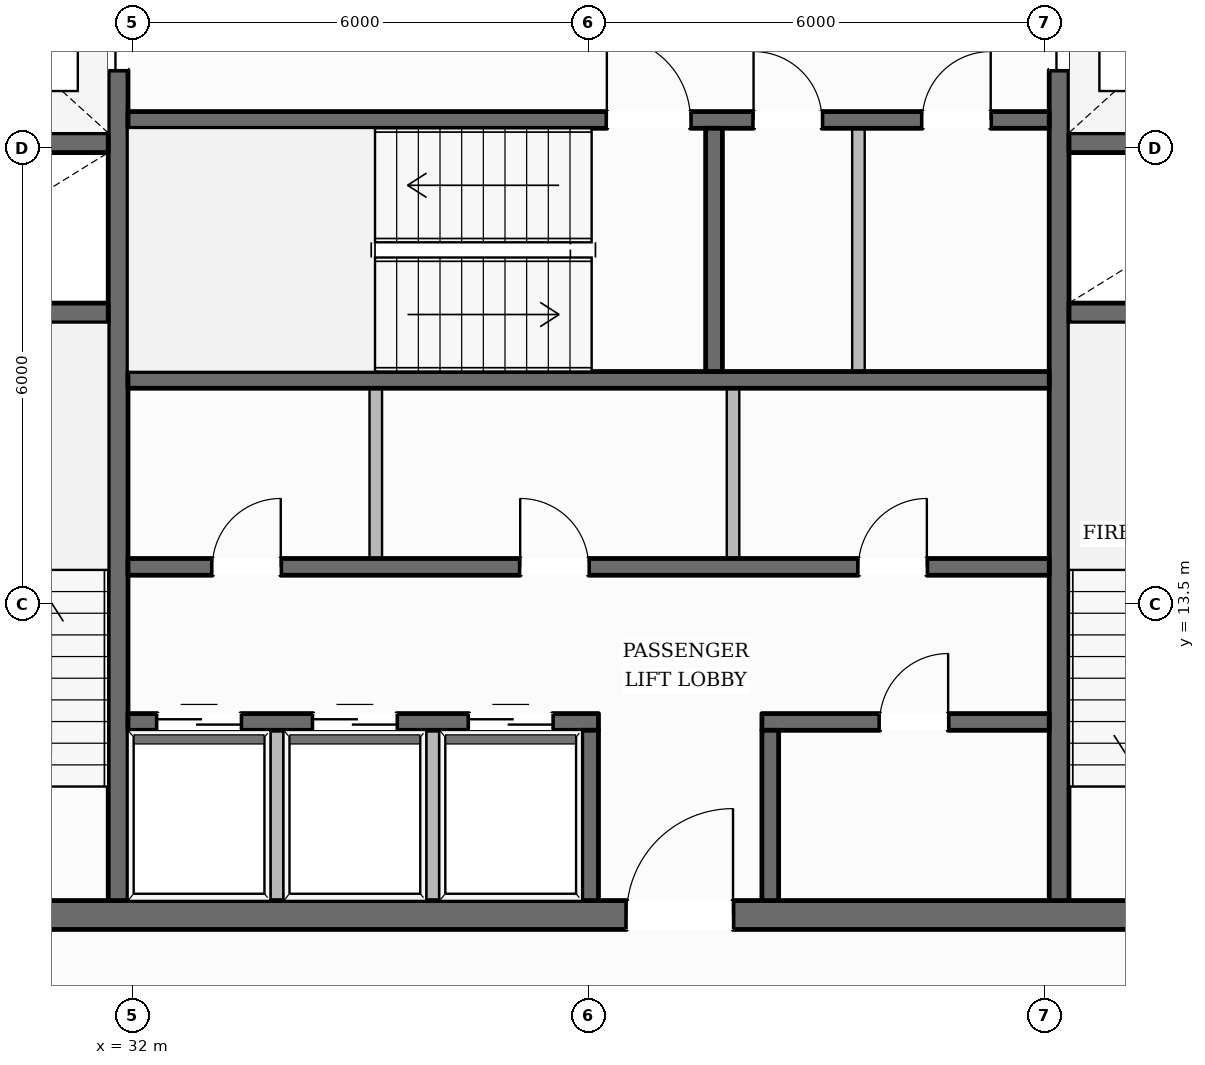
"""IFC4 building model, lengths in metres.
Left out: names, types, materials, properties, quantities, classifications, styles, units other than length and angle.
Written with IfcOpenShell. Run it as: python <this file> out.ifc"""

import sys

from ifc_helpers import new_model, si_unit, direction, frame, frame_2d, origin, place, context, subcontext, project, spatial, rectangle, extrude, element, fill, save


model = new_model("IFC4")
c1 = context("Model", 3, precision=1e-05, world=origin(), true_north=direction((0.0, 1.0)))
c2 = subcontext(c1, "Body", "Model", "MODEL_VIEW")
j1 = project(units=[si_unit("LENGTHUNIT", "METRE"), si_unit("PLANEANGLEUNIT", "RADIAN")], contexts=[c1])
p1 = place(None, origin())
s1 = spatial("IfcSite", under=j1, at=p1, CompositionType="ELEMENT")
p2 = place(p1, origin())
s2 = spatial("IfcBuilding", under=s1, at=p2, CompositionType="ELEMENT")
p3 = place(p2, frame((0.0, 0.0, 289.55)))
s3 = spatial("IfcBuildingStorey", under=s2, at=p3, CompositionType="ELEMENT", Elevation=289.55)
p4 = place(p3, frame((28.1, 9.41, 0.0), z_axis=(0.0, 0.0, 1.0), x_axis=(1.0, 0.0, 0.0)))
e1 = element("IfcWall", 1, at=p4, inside=s3, PredefinedType="SOLIDWALL", context=c2, shape_type="SweptSolid", body=[
    extrude(rectangle(XDim=19.8, YDim=0.38, at=frame_2d((9.9, 0.0))), origin(), (0.0, 0.0, 1.0), 3.61),
])
p5 = place(p4, frame((10.4, 0.0, 0.0)))
e2 = element("IfcOpeningElement", 2, at=p5, cuts=e1, PredefinedType="OPENING", context=c2, shape_type="SweptSolid", body=[
    extrude(rectangle(XDim=1.4, YDim=2.2, at=frame_2d((0.7, 1.1))), frame((0.0, 0.2, 0.0), z_axis=(0.0, -1.0, 0.0), x_axis=(1.0, 0.0, 0.0)), (0.0, 0.0, 1.0), 0.4),
])
p6 = place(p3, frame((31.81, 9.6, 0.0), z_axis=(0.0, 0.0, 1.0), x_axis=(0.0, 1.0, 0.0)))
e3 = element("IfcWall", 3, at=p6, inside=s3, PredefinedType="SHEAR", context=c2, shape_type="SweptSolid", body=[
    extrude(rectangle(XDim=13.0, YDim=0.26, at=frame_2d((6.5, 0.0))), origin(), (0.0, 0.0, 1.0), 3.61),
])
p7 = place(p6, frame((10.925, 0.0, 0.0)))
e4 = element("IfcOpeningElement", 4, at=p7, cuts=e3, PredefinedType="OPENING", context=c2, shape_type="SweptSolid", body=[
    extrude(rectangle(XDim=1.25, YDim=2.25, at=frame_2d((0.625, 1.125))), frame((0.0, 0.14, 0.0), z_axis=(0.0, -1.0, 0.0), x_axis=(1.0, 0.0, 0.0)), (0.0, 0.0, 1.0), 0.28),
])
p8 = place(p3, frame((44.19, 9.6, 0.0), z_axis=(0.0, 0.0, 1.0), x_axis=(0.0, 1.0, 0.0)))
e5 = element("IfcWall", 5, at=p8, inside=s3, PredefinedType="SHEAR", context=c2, shape_type="SweptSolid", body=[
    extrude(rectangle(XDim=13.0, YDim=0.26, at=frame_2d((6.5, 0.0))), origin(), (0.0, 0.0, 1.0), 3.61),
])
p9 = place(p8, frame((10.925, 0.0, 0.0)))
e6 = element("IfcOpeningElement", 6, at=p9, cuts=e5, PredefinedType="OPENING", context=c2, shape_type="SweptSolid", body=[
    extrude(rectangle(XDim=1.25, YDim=2.25, at=frame_2d((0.625, 1.125))), frame((0.0, 0.14, 0.0), z_axis=(0.0, -1.0, 0.0), x_axis=(1.0, 0.0, 0.0)), (0.0, 0.0, 1.0), 0.28),
])
for number, where, z_axis, x_axis in (
    (7, (28.48, 17.33, 0.0), (0.0, 0.0, 1.0), (1.0, 0.0, 0.0)),
    (8, (28.48, 19.57, 0.0), (0.0, 0.0, 1.0), (1.0, 0.0, 0.0)),
    (9, (44.32, 17.33, 0.0), (0.0, 0.0, 1.0), (1.0, 0.0, 0.0)),
    (10, (44.32, 19.57, 0.0), (0.0, 0.0, 1.0), (1.0, 0.0, 0.0)),
):
    element("IfcWall", number, at=place(p3, frame(where, z_axis=z_axis, x_axis=x_axis)), inside=s3, PredefinedType="SHEAR", context=c2, shape_type="SweptSolid", body=[
        extrude(rectangle(XDim=3.2, YDim=0.26, at=frame_2d((1.6, 0.0))), origin(), (0.0, 0.0, 1.0), 3.61),
    ])
p10 = place(p3, frame((31.94, 19.87, 0.0), z_axis=(0.0, 0.0, 1.0), x_axis=(1.0, 0.0, 0.0)))
e11 = element("IfcWall", 11, at=p10, inside=s3, PredefinedType="SOLIDWALL", context=c2, shape_type="SweptSolid", body=[
    extrude(rectangle(XDim=12.12, YDim=0.22, at=frame_2d((6.06, 0.0))), origin(), (0.0, 0.0, 1.0), 3.61),
])
p11 = place(p10, frame((6.3, 0.0, 0.0)))
e12 = element("IfcOpeningElement", 12, at=p11, cuts=e11, PredefinedType="OPENING", context=c2, shape_type="SweptSolid", body=[
    extrude(rectangle(XDim=1.1, YDim=2.15, at=frame_2d((0.55, 1.075))), frame((0.0, 0.12, 0.0), z_axis=(0.0, -1.0, 0.0), x_axis=(1.0, 0.0, 0.0)), (0.0, 0.0, 1.0), 0.24),
])
p12 = place(p10, frame((8.23, 0.0, 0.0)))
e13 = element("IfcOpeningElement", 13, at=p12, cuts=e11, PredefinedType="OPENING", context=c2, shape_type="SweptSolid", body=[
    extrude(rectangle(XDim=0.9, YDim=2.1, at=frame_2d((0.45, 1.05))), frame((0.0, 0.12, 0.0), z_axis=(0.0, -1.0, 0.0), x_axis=(1.0, 0.0, 0.0)), (0.0, 0.0, 1.0), 0.24),
])
p13 = place(p10, frame((10.45, 0.0, 0.0)))
e14 = element("IfcOpeningElement", 14, at=p13, cuts=e11, PredefinedType="OPENING", context=c2, shape_type="SweptSolid", body=[
    extrude(rectangle(XDim=0.9, YDim=2.1, at=frame_2d((0.45, 1.05))), frame((0.0, 0.12, 0.0), z_axis=(0.0, -1.0, 0.0), x_axis=(1.0, 0.0, 0.0)), (0.0, 0.0, 1.0), 0.24),
])
p14 = place(p3, frame((31.94, 16.45, 0.0), z_axis=(0.0, 0.0, 1.0), x_axis=(1.0, 0.0, 0.0)))
e15 = element("IfcWall", 15, at=p14, inside=s3, PredefinedType="SOLIDWALL", context=c2, shape_type="SweptSolid", body=[
    extrude(rectangle(XDim=12.12, YDim=0.22, at=frame_2d((6.06, 0.0))), origin(), (0.0, 0.0, 1.0), 3.61),
])
p15 = place(p3, frame((39.65, 16.56, 0.0), z_axis=(0.0, 0.0, 1.0), x_axis=(0.0, 1.0, 0.0)))
e16 = element("IfcWall", 16, at=p15, inside=s3, PredefinedType="SOLIDWALL", context=c2, shape_type="SweptSolid", body=[
    extrude(rectangle(XDim=3.2, YDim=0.22, at=frame_2d((1.6, 0.0))), origin(), (0.0, 0.0, 1.0), 3.61),
])
p16 = place(p3, frame((31.94, 13.99, 0.0), z_axis=(0.0, 0.0, 1.0), x_axis=(1.0, 0.0, 0.0)))
e17 = element("IfcWall", 17, at=p16, inside=s3, PredefinedType="SOLIDWALL", context=c2, shape_type="SweptSolid", body=[
    extrude(rectangle(XDim=12.12, YDim=0.22, at=frame_2d((6.06, 0.0))), origin(), (0.0, 0.0, 1.0), 3.61),
])
p17 = place(p16, frame((1.11, 0.0, 0.0)))
e18 = element("IfcOpeningElement", 18, at=p17, cuts=e17, PredefinedType="OPENING", context=c2, shape_type="SweptSolid", body=[
    extrude(rectangle(XDim=0.9, YDim=2.1, at=frame_2d((0.45, 1.05))), frame((0.0, 0.12, 0.0), z_axis=(0.0, -1.0, 0.0), x_axis=(1.0, 0.0, 0.0)), (0.0, 0.0, 1.0), 0.24),
])
p18 = place(p16, frame((5.16, 0.0, 0.0)))
e19 = element("IfcOpeningElement", 19, at=p18, cuts=e17, PredefinedType="OPENING", context=c2, shape_type="SweptSolid", body=[
    extrude(rectangle(XDim=0.9, YDim=2.1, at=frame_2d((0.45, 1.05))), frame((0.0, 0.12, 0.0), z_axis=(0.0, -1.0, 0.0), x_axis=(1.0, 0.0, 0.0)), (0.0, 0.0, 1.0), 0.24),
])
p19 = place(p16, frame((9.61, 0.0, 0.0)))
e20 = element("IfcOpeningElement", 20, at=p19, cuts=e17, PredefinedType="OPENING", context=c2, shape_type="SweptSolid", body=[
    extrude(rectangle(XDim=0.9, YDim=2.1, at=frame_2d((0.45, 1.05))), frame((0.0, 0.12, 0.0), z_axis=(0.0, -1.0, 0.0), x_axis=(1.0, 0.0, 0.0)), (0.0, 0.0, 1.0), 0.24),
])
p20 = place(p3, frame((31.94, 11.95, 0.0), z_axis=(0.0, 0.0, 1.0), x_axis=(1.0, 0.0, 0.0)))
e21 = element("IfcWall", 21, at=p20, inside=s3, PredefinedType="SOLIDWALL", context=c2, shape_type="SweptSolid", body=[
    extrude(rectangle(XDim=6.19, YDim=0.22, at=frame_2d((3.095, 0.0))), origin(), (0.0, 0.0, 1.0), 3.61),
])
p21 = place(p20, frame((0.385, 0.0, 0.0)))
e22 = element("IfcOpeningElement", 22, at=p21, cuts=e21, PredefinedType="OPENING", context=c2, shape_type="SweptSolid", body=[
    extrude(rectangle(XDim=1.1, YDim=2.2, at=frame_2d((0.55, 1.1))), frame((0.0, 0.12, 0.0), z_axis=(0.0, -1.0, 0.0), x_axis=(1.0, 0.0, 0.0)), (0.0, 0.0, 1.0), 0.24),
])
p22 = place(p20, frame((2.435, 0.0, 0.0)))
e23 = element("IfcOpeningElement", 23, at=p22, cuts=e21, PredefinedType="OPENING", context=c2, shape_type="SweptSolid", body=[
    extrude(rectangle(XDim=1.1, YDim=2.2, at=frame_2d((0.55, 1.1))), frame((0.0, 0.12, 0.0), z_axis=(0.0, -1.0, 0.0), x_axis=(1.0, 0.0, 0.0)), (0.0, 0.0, 1.0), 0.24),
])
p23 = place(p20, frame((4.485, 0.0, 0.0)))
e24 = element("IfcOpeningElement", 24, at=p23, cuts=e21, PredefinedType="OPENING", context=c2, shape_type="SweptSolid", body=[
    extrude(rectangle(XDim=1.1, YDim=2.2, at=frame_2d((0.55, 1.1))), frame((0.0, 0.12, 0.0), z_axis=(0.0, -1.0, 0.0), x_axis=(1.0, 0.0, 0.0)), (0.0, 0.0, 1.0), 0.24),
])
p24 = place(p3, frame((40.28, 11.95, 0.0), z_axis=(0.0, 0.0, 1.0), x_axis=(1.0, 0.0, 0.0)))
e25 = element("IfcWall", 25, at=p24, inside=s3, PredefinedType="SOLIDWALL", context=c2, shape_type="SweptSolid", body=[
    extrude(rectangle(XDim=3.78, YDim=0.22, at=frame_2d((1.89, 0.0))), origin(), (0.0, 0.0, 1.0), 3.61),
])
p25 = place(p24, frame((1.55, 0.0, 0.0)))
e26 = element("IfcOpeningElement", 26, at=p25, cuts=e25, PredefinedType="OPENING", context=c2, shape_type="SweptSolid", body=[
    extrude(rectangle(XDim=0.9, YDim=2.1, at=frame_2d((0.45, 1.05))), frame((0.0, 0.12, 0.0), z_axis=(0.0, -1.0, 0.0), x_axis=(1.0, 0.0, 0.0)), (0.0, 0.0, 1.0), 0.24),
])
for number, where, z_axis, x_axis in (
    (27, (38.02, 9.6, 0.0), (0.0, 0.0, 1.0), (0.0, 1.0, 0.0)),
    (28, (40.39, 9.6, 0.0), (0.0, 0.0, 1.0), (0.0, 1.0, 0.0)),
):
    element("IfcWall", number, at=place(p3, frame(where, z_axis=z_axis, x_axis=x_axis)), inside=s3, PredefinedType="SOLIDWALL", context=c2, shape_type="SweptSolid", body=[
        extrude(rectangle(XDim=2.24, YDim=0.22, at=frame_2d((1.12, 0.0))), origin(), (0.0, 0.0, 1.0), 3.61),
    ])
p26 = place(p3, frame((15.251, 10.013, 0.0), z_axis=(0.0, 0.0, 1.0), x_axis=(0.505125442866, 0.863045935608, 0.0)))
e29 = element("IfcWall", 29, at=p26, inside=s3, PredefinedType="STANDARD", context=c2, shape_type="SweptSolid", body=[
    extrude(rectangle(XDim=39.517, YDim=0.35, at=frame_2d((19.759, 0.0))), origin(), (0.0, 0.0, 1.0), 3.196),
])
p27 = place(p26, frame((35.157, 0.0, 0.65)))
e30 = element("IfcOpeningElement", 30, at=p27, cuts=e29, PredefinedType="OPENING", context=c2, shape_type="SweptSolid", body=[
    extrude(rectangle(XDim=1.35, YDim=1.75, at=frame_2d((0.675, 0.875))), frame((0.0, 0.185, 0.0), z_axis=(0.0, -1.0, 0.0), x_axis=(1.0, 0.0, 0.0)), (0.0, 0.0, 1.0), 0.37),
])
p28 = place(p26, frame((28.729, 0.0, 0.65)))
e31 = element("IfcOpeningElement", 31, at=p28, cuts=e29, PredefinedType="OPENING", context=c2, shape_type="SweptSolid", body=[
    extrude(rectangle(XDim=1.35, YDim=1.75, at=frame_2d((0.675, 0.875))), frame((0.0, 0.185, 0.0), z_axis=(0.0, -1.0, 0.0), x_axis=(1.0, 0.0, 0.0)), (0.0, 0.0, 1.0), 0.37),
])
p29 = place(p26, frame((15.872, 0.0, 0.65)))
e32 = element("IfcOpeningElement", 32, at=p29, cuts=e29, PredefinedType="OPENING", context=c2, shape_type="SweptSolid", body=[
    extrude(rectangle(XDim=1.35, YDim=1.75, at=frame_2d((0.675, 0.875))), frame((0.0, 0.185, 0.0), z_axis=(0.0, -1.0, 0.0), x_axis=(1.0, 0.0, 0.0)), (0.0, 0.0, 1.0), 0.37),
])
p30 = place(p26, frame((9.444, 0.0, 0.65)))
e33 = element("IfcOpeningElement", 33, at=p30, cuts=e29, PredefinedType="OPENING", context=c2, shape_type="SweptSolid", body=[
    extrude(rectangle(XDim=1.35, YDim=1.75, at=frame_2d((0.675, 0.875))), frame((0.0, 0.185, 0.0), z_axis=(0.0, -1.0, 0.0), x_axis=(1.0, 0.0, 0.0)), (0.0, 0.0, 1.0), 0.37),
])
p31 = place(p26, frame((3.016, 0.0, 0.65)))
e34 = element("IfcOpeningElement", 34, at=p31, cuts=e29, PredefinedType="OPENING", context=c2, shape_type="SweptSolid", body=[
    extrude(rectangle(XDim=1.35, YDim=1.75, at=frame_2d((0.675, 0.875))), frame((0.0, 0.185, 0.0), z_axis=(0.0, -1.0, 0.0), x_axis=(1.0, 0.0, 0.0)), (0.0, 0.0, 1.0), 0.37),
])
p32 = place(p3, frame((40.664, 44.194, 0.0), z_axis=(0.0, 0.0, 1.0), x_axis=(0.494747407388, -0.869036824814, 0.0)))
e35 = element("IfcWall", 35, at=p32, inside=s3, PredefinedType="STANDARD", context=c2, shape_type="SweptSolid", body=[
    extrude(rectangle(XDim=38.713, YDim=0.35, at=frame_2d((19.357, 0.0))), origin(), (0.0, 0.0, 1.0), 3.196),
])
p33 = place(p32, frame((34.415, 0.0, 0.65)))
e36 = element("IfcOpeningElement", 36, at=p33, cuts=e35, PredefinedType="OPENING", context=c2, shape_type="SweptSolid", body=[
    extrude(rectangle(XDim=1.35, YDim=1.75, at=frame_2d((0.675, 0.875))), frame((0.0, 0.185, 0.0), z_axis=(0.0, -1.0, 0.0), x_axis=(1.0, 0.0, 0.0)), (0.0, 0.0, 1.0), 0.37),
])
p34 = place(p32, frame((28.123, 0.0, 0.65)))
e37 = element("IfcOpeningElement", 37, at=p34, cuts=e35, PredefinedType="OPENING", context=c2, shape_type="SweptSolid", body=[
    extrude(rectangle(XDim=1.35, YDim=1.75, at=frame_2d((0.675, 0.875))), frame((0.0, 0.185, 0.0), z_axis=(0.0, -1.0, 0.0), x_axis=(1.0, 0.0, 0.0)), (0.0, 0.0, 1.0), 0.37),
])
p35 = place(p32, frame((15.539, 0.0, 0.65)))
e38 = element("IfcOpeningElement", 38, at=p35, cuts=e35, PredefinedType="OPENING", context=c2, shape_type="SweptSolid", body=[
    extrude(rectangle(XDim=1.35, YDim=1.75, at=frame_2d((0.675, 0.875))), frame((0.0, 0.185, 0.0), z_axis=(0.0, -1.0, 0.0), x_axis=(1.0, 0.0, 0.0)), (0.0, 0.0, 1.0), 0.37),
])
p36 = place(p32, frame((9.246, 0.0, 0.65)))
e39 = element("IfcOpeningElement", 39, at=p36, cuts=e35, PredefinedType="OPENING", context=c2, shape_type="SweptSolid", body=[
    extrude(rectangle(XDim=1.35, YDim=1.75, at=frame_2d((0.675, 0.875))), frame((0.0, 0.185, 0.0), z_axis=(0.0, -1.0, 0.0), x_axis=(1.0, 0.0, 0.0)), (0.0, 0.0, 1.0), 0.37),
])
p37 = place(p32, frame((2.954, 0.0, 0.65)))
e40 = element("IfcOpeningElement", 40, at=p37, cuts=e35, PredefinedType="OPENING", context=c2, shape_type="SweptSolid", body=[
    extrude(rectangle(XDim=1.35, YDim=1.75, at=frame_2d((0.675, 0.875))), frame((0.0, 0.185, 0.0), z_axis=(0.0, -1.0, 0.0), x_axis=(1.0, 0.0, 0.0)), (0.0, 0.0, 1.0), 0.37),
])
for number, where, z_axis, x_axis in (
    (41, (33.9, 9.49, 0.0), (0.0, 0.0, 1.0), (0.0, 1.0, 0.0)),
    (42, (35.95, 9.49, 0.0), (0.0, 0.0, 1.0), (0.0, 1.0, 0.0)),
):
    element("IfcWall", number, at=place(p3, frame(where, z_axis=z_axis, x_axis=x_axis)), inside=s3, PredefinedType="PARTITIONING", context=c2, shape_type="SweptSolid", body=[
        extrude(rectangle(XDim=2.35, YDim=0.165, at=frame_2d((1.175, 0.0))), origin(), (0.0, 0.0, 1.0), 3.61),
    ])
for number, where, z_axis, x_axis in (
    (43, (35.2, 14.1, 0.0), (0.0, 0.0, 1.0), (0.0, 1.0, 0.0)),
    (44, (39.9, 14.1, 0.0), (0.0, 0.0, 1.0), (0.0, 1.0, 0.0)),
):
    element("IfcWall", number, at=place(p3, frame(where, z_axis=z_axis, x_axis=x_axis)), inside=s3, PredefinedType="PARTITIONING", context=c2, shape_type="SweptSolid", body=[
        extrude(rectangle(XDim=2.24, YDim=0.165, at=frame_2d((1.12, 0.0))), origin(), (0.0, 0.0, 1.0), 3.61),
    ])
p38 = place(p3, frame((41.55, 16.56, 0.0), z_axis=(0.0, 0.0, 1.0), x_axis=(0.0, 1.0, 0.0)))
e45 = element("IfcWall", 45, at=p38, inside=s3, PredefinedType="PARTITIONING", context=c2, shape_type="SweptSolid", body=[
    extrude(rectangle(XDim=3.2, YDim=0.165, at=frame_2d((1.6, 0.0))), origin(), (0.0, 0.0, 1.0), 3.61),
])
p39 = place(p11, origin())
e46 = element("IfcDoor", 46, at=p39, inside=s3, OperationType="SINGLE_SWING_LEFT", PredefinedType="DOOR", context=c2, shape_type="SweptSolid", body=[
    extrude(rectangle(XDim=1.1, YDim=2.15, at=frame_2d((0.55, 1.075))), frame((0.0, 0.025, 0.0), z_axis=(0.0, -1.0, 0.0), x_axis=(1.0, 0.0, 0.0)), (0.0, 0.0, 1.0), 0.05),
])
fill(e12, e46)
p40 = place(p7, origin())
e47 = element("IfcDoor", 47, at=p40, inside=s3, OperationType="DOUBLE_DOOR_SLIDING", PredefinedType="DOOR", context=c2, shape_type="SweptSolid", body=[
    extrude(rectangle(XDim=1.25, YDim=2.25, at=frame_2d((0.625, 1.125))), frame((0.0, 0.025, 0.0), z_axis=(0.0, -1.0, 0.0), x_axis=(1.0, 0.0, 0.0)), (0.0, 0.0, 1.0), 0.05),
])
fill(e4, e47)
p41 = place(p9, origin())
e48 = element("IfcDoor", 48, at=p41, inside=s3, OperationType="DOUBLE_DOOR_SLIDING", PredefinedType="DOOR", context=c2, shape_type="SweptSolid", body=[
    extrude(rectangle(XDim=1.25, YDim=2.25, at=frame_2d((0.625, 1.125))), frame((0.0, 0.025, 0.0), z_axis=(0.0, -1.0, 0.0), x_axis=(1.0, 0.0, 0.0)), (0.0, 0.0, 1.0), 0.05),
])
fill(e6, e48)
p42 = place(p5, origin())
e49 = element("IfcDoor", 49, at=p42, inside=s3, OperationType="SINGLE_SWING_RIGHT", PredefinedType="DOOR", context=c2, shape_type="SweptSolid", body=[
    extrude(rectangle(XDim=1.4, YDim=2.2, at=frame_2d((0.7, 1.1))), frame((0.0, 0.025, 0.0), z_axis=(0.0, -1.0, 0.0), x_axis=(1.0, 0.0, 0.0)), (0.0, 0.0, 1.0), 0.05),
])
fill(e2, e49)
p43 = place(p21, origin())
e50 = element("IfcDoor", 50, at=p43, inside=s3, OperationType="DOUBLE_DOOR_SLIDING", PredefinedType="DOOR", context=c2, shape_type="SweptSolid", body=[
    extrude(rectangle(XDim=1.1, YDim=2.2, at=frame_2d((0.55, 1.1))), frame((0.0, 0.025, 0.0), z_axis=(0.0, -1.0, 0.0), x_axis=(1.0, 0.0, 0.0)), (0.0, 0.0, 1.0), 0.05),
])
fill(e22, e50)
p44 = place(p22, origin())
e51 = element("IfcDoor", 51, at=p44, inside=s3, OperationType="DOUBLE_DOOR_SLIDING", PredefinedType="DOOR", context=c2, shape_type="SweptSolid", body=[
    extrude(rectangle(XDim=1.1, YDim=2.2, at=frame_2d((0.55, 1.1))), frame((0.0, 0.025, 0.0), z_axis=(0.0, -1.0, 0.0), x_axis=(1.0, 0.0, 0.0)), (0.0, 0.0, 1.0), 0.05),
])
fill(e23, e51)
p45 = place(p23, origin())
e52 = element("IfcDoor", 52, at=p45, inside=s3, OperationType="DOUBLE_DOOR_SLIDING", PredefinedType="DOOR", context=c2, shape_type="SweptSolid", body=[
    extrude(rectangle(XDim=1.1, YDim=2.2, at=frame_2d((0.55, 1.1))), frame((0.0, 0.025, 0.0), z_axis=(0.0, -1.0, 0.0), x_axis=(1.0, 0.0, 0.0)), (0.0, 0.0, 1.0), 0.05),
])
fill(e24, e52)
p46 = place(p17, origin())
e53 = element("IfcDoor", 53, at=p46, inside=s3, OperationType="SINGLE_SWING_RIGHT", PredefinedType="DOOR", context=c2, shape_type="SweptSolid", body=[
    extrude(rectangle(XDim=0.9, YDim=2.1, at=frame_2d((0.45, 1.05))), frame((0.0, 0.025, 0.0), z_axis=(0.0, -1.0, 0.0), x_axis=(1.0, 0.0, 0.0)), (0.0, 0.0, 1.0), 0.05),
])
fill(e18, e53)
p47 = place(p18, origin())
e54 = element("IfcDoor", 54, at=p47, inside=s3, OperationType="SINGLE_SWING_LEFT", PredefinedType="DOOR", context=c2, shape_type="SweptSolid", body=[
    extrude(rectangle(XDim=0.9, YDim=2.1, at=frame_2d((0.45, 1.05))), frame((0.0, 0.025, 0.0), z_axis=(0.0, -1.0, 0.0), x_axis=(1.0, 0.0, 0.0)), (0.0, 0.0, 1.0), 0.05),
])
fill(e19, e54)
p48 = place(p19, origin())
e55 = element("IfcDoor", 55, at=p48, inside=s3, OperationType="SINGLE_SWING_RIGHT", PredefinedType="DOOR", context=c2, shape_type="SweptSolid", body=[
    extrude(rectangle(XDim=0.9, YDim=2.1, at=frame_2d((0.45, 1.05))), frame((0.0, 0.025, 0.0), z_axis=(0.0, -1.0, 0.0), x_axis=(1.0, 0.0, 0.0)), (0.0, 0.0, 1.0), 0.05),
])
fill(e20, e55)
p49 = place(p12, origin())
e56 = element("IfcDoor", 56, at=p49, inside=s3, OperationType="SINGLE_SWING_LEFT", PredefinedType="DOOR", context=c2, shape_type="SweptSolid", body=[
    extrude(rectangle(XDim=0.9, YDim=2.1, at=frame_2d((0.45, 1.05))), frame((0.0, 0.025, 0.0), z_axis=(0.0, -1.0, 0.0), x_axis=(1.0, 0.0, 0.0)), (0.0, 0.0, 1.0), 0.05),
])
fill(e13, e56)
p50 = place(p13, origin())
e57 = element("IfcDoor", 57, at=p50, inside=s3, OperationType="SINGLE_SWING_RIGHT", PredefinedType="DOOR", context=c2, shape_type="SweptSolid", body=[
    extrude(rectangle(XDim=0.9, YDim=2.1, at=frame_2d((0.45, 1.05))), frame((0.0, 0.025, 0.0), z_axis=(0.0, -1.0, 0.0), x_axis=(1.0, 0.0, 0.0)), (0.0, 0.0, 1.0), 0.05),
])
fill(e14, e57)
p51 = place(p25, origin())
e58 = element("IfcDoor", 58, at=p51, inside=s3, OperationType="SINGLE_SWING_RIGHT", PredefinedType="DOOR", context=c2, shape_type="SweptSolid", body=[
    extrude(rectangle(XDim=0.9, YDim=2.1, at=frame_2d((0.45, 1.05))), frame((0.0, 0.025, 0.0), z_axis=(0.0, -1.0, 0.0), x_axis=(1.0, 0.0, 0.0)), (0.0, 0.0, 1.0), 0.05),
])
fill(e26, e58)
save(model, sys.argv[1])
